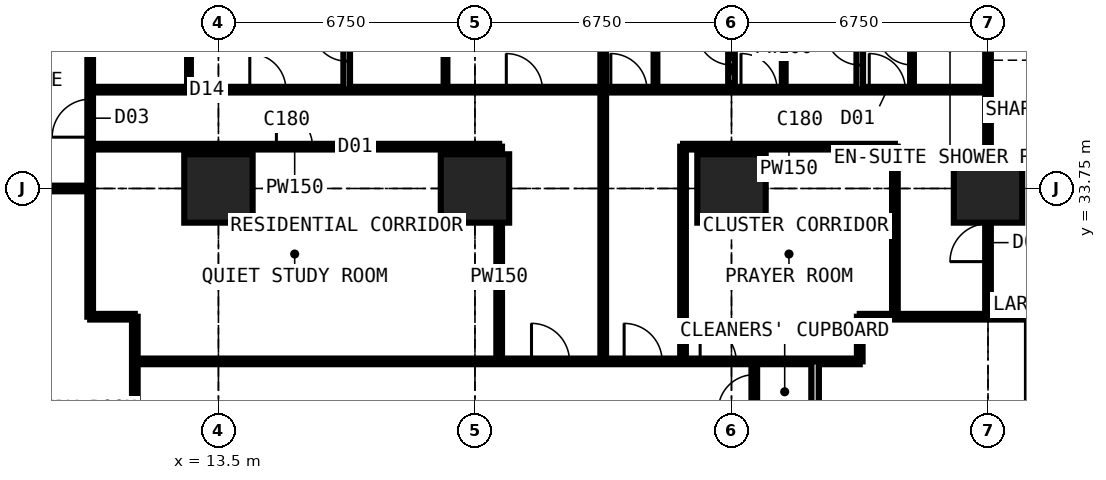
"""IFC4 building model, lengths in metres.
Left out: names, types, materials, properties, quantities, classifications, styles, units other than length and angle.
Written with IfcOpenShell. Run it as: python <this file> out.ifc"""

import sys

from ifc_helpers import new_model, si_unit, direction, frame, frame_2d, origin, origin_2d, place, context, subcontext, project, spatial, rectangle, extrude, element, fill, save


model = new_model("IFC4")
c1 = context("Model", 3, precision=1e-05, world=origin(), true_north=direction((0.0, 1.0)))
c2 = subcontext(c1, "Body", "Model", "MODEL_VIEW")
j1 = project(units=[si_unit("LENGTHUNIT", "METRE"), si_unit("PLANEANGLEUNIT", "RADIAN")], contexts=[c1])
p1 = place(None, origin())
s1 = spatial("IfcSite", under=j1, at=p1, CompositionType="ELEMENT")
p2 = place(p1, origin())
s2 = spatial("IfcBuilding", under=s1, at=p2, CompositionType="ELEMENT")
p3 = place(p2, frame((0.0, 0.0, 54.0)))
s3 = spatial("IfcBuildingStorey", under=s2, at=p3, CompositionType="ELEMENT", Elevation=54.0)
for number, where, z_axis, x_axis in (
    (1, (13.5, 33.75, 0.0), (0.0, 0.0, 1.0), (1.0, 0.0, 0.0)),
    (2, (20.25, 33.75, 0.0), (0.0, 0.0, 1.0), (1.0, 0.0, 0.0)),
    (3, (27.0, 33.75, 0.0), (0.0, 0.0, 1.0), (1.0, 0.0, 0.0)),
    (4, (33.75, 33.75, 0.0), (0.0, 0.0, 1.0), (1.0, 0.0, 0.0)),
):
    element("IfcColumn", number, at=place(p3, frame(where, z_axis=z_axis, x_axis=x_axis)), inside=s3, PredefinedType="COLUMN", context=c2, shape_type="SweptSolid", body=[
        extrude(rectangle(XDim=1.8, YDim=1.8, at=origin_2d()), origin(), (0.0, 0.0, 1.0), 3.6),
    ])
p4 = place(p3, frame((4.15, 33.75, 0.0), z_axis=(0.0, 0.0, 1.0), x_axis=(1.0, 0.0, 0.0)))
e5 = element("IfcWall", 5, at=p4, inside=s3, PredefinedType="PARTITIONING", context=c2, shape_type="SweptSolid", body=[
    extrude(rectangle(XDim=5.975, YDim=0.15, at=frame_2d((2.988, 0.0))), origin(), (0.0, 0.0, 1.0), 2.877),
])
p5 = place(p3, frame((10.125, 30.375, 0.0), z_axis=(0.0, 0.0, 1.0), x_axis=(0.0, 1.0, 0.0)))
e6 = element("IfcWall", 6, at=p5, inside=s3, PredefinedType="PARTITIONING", context=c2, shape_type="SweptSolid", body=[
    extrude(rectangle(XDim=10.859, YDim=0.15, at=frame_2d((5.429, 0.0))), origin(), (0.0, 0.0, 1.0), 3.375),
])
p6 = place(p5, frame((4.725, 0.0, 0.0)))
e7 = element("IfcOpeningElement", 7, at=p6, cuts=e6, PredefinedType="OPENING", context=c2, shape_type="SweptSolid", body=[
    extrude(rectangle(XDim=1.0, YDim=2.2, at=frame_2d((0.5, 1.1))), frame((0.0, 0.085, 0.0), z_axis=(0.0, -1.0, 0.0), x_axis=(1.0, 0.0, 0.0)), (0.0, 0.0, 1.0), 0.17),
])
p7 = place(p3, frame((10.125, 30.375, 0.0), z_axis=(0.0, 0.0, 1.0), x_axis=(1.0, 0.0, 0.0)))
e8 = element("IfcWall", 8, at=p7, inside=s3, PredefinedType="PARTITIONING", context=c2, shape_type="SweptSolid", body=[
    extrude(rectangle(XDim=1.175, YDim=0.15, at=frame_2d((0.587, 0.0))), origin(), (0.0, 0.0, 1.0), 3.375),
])
p8 = place(p3, frame((10.125, 34.85, 0.0), z_axis=(0.0, 0.0, 1.0), x_axis=(1.0, 0.0, 0.0)))
e9 = element("IfcWall", 9, at=p8, inside=s3, PredefinedType="PARTITIONING", context=c2, shape_type="SweptSolid", body=[
    extrude(rectangle(XDim=10.762, YDim=0.15, at=frame_2d((5.381, 0.0))), origin(), (0.0, 0.0, 1.0), 3.375),
])
p9 = place(p8, frame((4.9, 0.0, 0.0)))
e10 = element("IfcOpeningElement", 10, at=p9, cuts=e9, PredefinedType="OPENING", context=c2, shape_type="SweptSolid", body=[
    extrude(rectangle(XDim=0.95, YDim=2.2, at=frame_2d((0.475, 1.1))), frame((0.0, 0.085, 0.0), z_axis=(0.0, -1.0, 0.0), x_axis=(1.0, 0.0, 0.0)), (0.0, 0.0, 1.0), 0.17),
])
p10 = place(p3, frame((10.125, 36.35, 0.0), z_axis=(0.0, 0.0, 1.0), x_axis=(1.0, 0.0, 0.0)))
e11 = element("IfcWall", 11, at=p10, inside=s3, PredefinedType="PARTITIONING", context=c2, shape_type="SweptSolid", body=[
    extrude(rectangle(XDim=23.625, YDim=0.15, at=frame_2d((11.812, 0.0))), origin(), (0.0, 0.0, 1.0), 3.375),
])
p11 = place(p10, frame((20.5, 0.0, 0.0)))
e12 = element("IfcOpeningElement", 12, at=p11, cuts=e11, PredefinedType="OPENING", context=c2, shape_type="SweptSolid", body=[
    extrude(rectangle(XDim=0.95, YDim=2.2, at=frame_2d((0.475, 1.1))), frame((0.0, 0.085, 0.0), z_axis=(0.0, -1.0, 0.0), x_axis=(1.0, 0.0, 0.0)), (0.0, 0.0, 1.0), 0.17),
])
p12 = place(p10, frame((17.125, 0.0, 0.0)))
e13 = element("IfcOpeningElement", 13, at=p12, cuts=e11, PredefinedType="OPENING", context=c2, shape_type="SweptSolid", body=[
    extrude(rectangle(XDim=0.95, YDim=2.2, at=frame_2d((0.475, 1.1))), frame((0.0, 0.085, 0.0), z_axis=(0.0, -1.0, 0.0), x_axis=(1.0, 0.0, 0.0)), (0.0, 0.0, 1.0), 0.17),
])
p13 = place(p10, frame((13.7, 0.0, 0.0)))
e14 = element("IfcOpeningElement", 14, at=p13, cuts=e11, PredefinedType="OPENING", context=c2, shape_type="SweptSolid", body=[
    extrude(rectangle(XDim=0.95, YDim=2.2, at=frame_2d((0.475, 1.1))), frame((0.0, 0.085, 0.0), z_axis=(0.0, -1.0, 0.0), x_axis=(1.0, 0.0, 0.0)), (0.0, 0.0, 1.0), 0.17),
])
p14 = place(p10, frame((4.2, 0.0, 0.0)))
e15 = element("IfcOpeningElement", 15, at=p14, cuts=e11, PredefinedType="OPENING", context=c2, shape_type="SweptSolid", body=[
    extrude(rectangle(XDim=0.95, YDim=2.2, at=frame_2d((0.475, 1.1))), frame((0.0, 0.085, 0.0), z_axis=(0.0, -1.0, 0.0), x_axis=(1.0, 0.0, 0.0)), (0.0, 0.0, 1.0), 0.17),
])
p15 = place(p10, frame((10.95, 0.0, 0.0)))
e16 = element("IfcOpeningElement", 16, at=p15, cuts=e11, PredefinedType="OPENING", context=c2, shape_type="SweptSolid", body=[
    extrude(rectangle(XDim=0.95, YDim=2.2, at=frame_2d((0.475, 1.1))), frame((0.0, 0.085, 0.0), z_axis=(0.0, -1.0, 0.0), x_axis=(1.0, 0.0, 0.0)), (0.0, 0.0, 1.0), 0.17),
])
p16 = place(p3, frame((11.3, 11.3, 0.0), z_axis=(0.0, 0.0, 1.0), x_axis=(0.0, 1.0, 0.0)))
e17 = element("IfcWall", 17, at=p16, inside=s3, PredefinedType="PARTITIONING", context=c2, shape_type="SweptSolid", body=[
    extrude(rectangle(XDim=19.075, YDim=0.15, at=frame_2d((9.538, 0.0))), origin(), (0.0, 0.0, 1.0), 3.375),
])
p17 = place(p16, frame((10.137, 0.0, 0.0)))
e18 = element("IfcOpeningElement", 18, at=p17, cuts=e17, PredefinedType="OPENING", context=c2, shape_type="SweptSolid", body=[
    extrude(rectangle(XDim=1.0, YDim=2.2, at=frame_2d((0.5, 1.1))), frame((0.0, 0.085, 0.0), z_axis=(0.0, -1.0, 0.0), x_axis=(1.0, 0.0, 0.0)), (0.0, 0.0, 1.0), 0.17),
])
p18 = place(p3, frame((11.3, 29.2, 0.0), z_axis=(0.0, 0.0, 1.0), x_axis=(1.0, 0.0, 0.0)))
e19 = element("IfcWall", 19, at=p18, inside=s3, PredefinedType="PARTITIONING", context=c2, shape_type="SweptSolid", body=[
    extrude(rectangle(XDim=19.075, YDim=0.15, at=frame_2d((9.538, 0.0))), origin(), (0.0, 0.0, 1.0), 3.375),
])
p19 = place(p18, frame((12.875, 0.0, 0.0)))
e20 = element("IfcOpeningElement", 20, at=p19, cuts=e19, PredefinedType="OPENING", context=c2, shape_type="SweptSolid", body=[
    extrude(rectangle(XDim=1.0, YDim=2.2, at=frame_2d((0.5, 1.1))), frame((0.0, 0.085, 0.0), z_axis=(0.0, -1.0, 0.0), x_axis=(1.0, 0.0, 0.0)), (0.0, 0.0, 1.0), 0.17),
])
p20 = place(p18, frame((10.438, 0.0, 0.0)))
e21 = element("IfcOpeningElement", 21, at=p20, cuts=e19, PredefinedType="OPENING", context=c2, shape_type="SweptSolid", body=[
    extrude(rectangle(XDim=1.0, YDim=2.2, at=frame_2d((0.5, 1.1))), frame((0.0, 0.085, 0.0), z_axis=(0.0, -1.0, 0.0), x_axis=(1.0, 0.0, 0.0)), (0.0, 0.0, 1.0), 0.17),
])
p21 = place(p18, frame((14.875, 0.0, 0.0)))
e22 = element("IfcOpeningElement", 22, at=p21, cuts=e19, PredefinedType="OPENING", context=c2, shape_type="SweptSolid", body=[
    extrude(rectangle(XDim=0.95, YDim=2.2, at=frame_2d((0.475, 1.1))), frame((0.0, 0.085, 0.0), z_axis=(0.0, -1.0, 0.0), x_axis=(1.0, 0.0, 0.0)), (0.0, 0.0, 1.0), 0.17),
])
p22 = place(p3, frame((12.725, 36.35, 0.0), z_axis=(0.0, 0.0, 1.0), x_axis=(0.0, 1.0, 0.0)))
e23 = element("IfcWall", 23, at=p22, inside=s3, PredefinedType="PARTITIONING", context=c2, shape_type="SweptSolid", body=[
    extrude(rectangle(XDim=2.4, YDim=0.1, at=frame_2d((1.2, 0.0))), origin(), (0.0, 0.0, 1.0), 3.375),
])
p23 = place(p3, frame((16.875, 36.35, 0.0), z_axis=(0.0, 0.0, 1.0), x_axis=(0.0, 1.0, 0.0)))
e24 = element("IfcWall", 24, at=p23, inside=s3, PredefinedType="PARTITIONING", context=c2, shape_type="SweptSolid", body=[
    extrude(rectangle(XDim=4.884, YDim=0.175, at=frame_2d((2.442, 0.0))), origin(), (0.0, 0.0, 1.0), 3.375),
])
p24 = place(p23, frame((0.75, 0.0, 0.0)))
e25 = element("IfcOpeningElement", 25, at=p24, cuts=e24, PredefinedType="OPENING", context=c2, shape_type="SweptSolid", body=[
    extrude(rectangle(XDim=0.9, YDim=2.2, at=frame_2d((0.45, 1.1))), frame((0.0, 0.097, 0.0), z_axis=(0.0, -1.0, 0.0), x_axis=(1.0, 0.0, 0.0)), (0.0, 0.0, 1.0), 0.195),
])
p25 = place(p3, frame((19.475, 36.35, 0.0), z_axis=(0.0, 0.0, 1.0), x_axis=(0.0, 1.0, 0.0)))
e26 = element("IfcWall", 26, at=p25, inside=s3, PredefinedType="PARTITIONING", context=c2, shape_type="SweptSolid", body=[
    extrude(rectangle(XDim=2.4, YDim=0.1, at=frame_2d((1.2, 0.0))), origin(), (0.0, 0.0, 1.0), 3.375),
])
p26 = place(p3, frame((20.887, 29.2, 0.0), z_axis=(0.0, 0.0, 1.0), x_axis=(0.0, 1.0, 0.0)))
e27 = element("IfcWall", 27, at=p26, inside=s3, PredefinedType="PARTITIONING", context=c2, shape_type="SweptSolid", body=[
    extrude(rectangle(XDim=5.65, YDim=0.15, at=frame_2d((2.825, 0.0))), origin(), (0.0, 0.0, 1.0), 3.375),
])
p27 = place(p3, frame((23.625, 29.2, 0.0), z_axis=(0.0, 0.0, 1.0), x_axis=(0.0, 1.0, 0.0)))
e28 = element("IfcWall", 28, at=p27, inside=s3, PredefinedType="PARTITIONING", context=c2, shape_type="SweptSolid", body=[
    extrude(rectangle(XDim=12.034, YDim=0.15, at=frame_2d((6.017, 0.0))), origin(), (0.0, 0.0, 1.0), 3.375),
])
p28 = place(p3, frame((25.0, 36.35, 0.0), z_axis=(0.0, 0.0, 1.0), x_axis=(0.0, 1.0, 0.0)))
e29 = element("IfcWall", 29, at=p28, inside=s3, PredefinedType="PARTITIONING", context=c2, shape_type="SweptSolid", body=[
    extrude(rectangle(XDim=2.2, YDim=0.1, at=frame_2d((1.1, 0.0))), origin(), (0.0, 0.0, 1.0), 3.375),
])
p29 = place(p3, frame((25.725, 29.2, 0.0), z_axis=(0.0, 0.0, 1.0), x_axis=(0.0, 1.0, 0.0)))
e30 = element("IfcWall", 30, at=p29, inside=s3, PredefinedType="PARTITIONING", context=c2, shape_type="SweptSolid", body=[
    extrude(rectangle(XDim=5.65, YDim=0.15, at=frame_2d((2.825, 0.0))), origin(), (0.0, 0.0, 1.0), 3.375),
])
p30 = place(p3, frame((25.725, 34.85, 0.0), z_axis=(0.0, 0.0, 1.0), x_axis=(1.0, 0.0, 0.0)))
e31 = element("IfcWall", 31, at=p30, inside=s3, PredefinedType="PARTITIONING", context=c2, shape_type="SweptSolid", body=[
    extrude(rectangle(XDim=5.575, YDim=0.15, at=frame_2d((2.788, 0.0))), origin(), (0.0, 0.0, 1.0), 3.375),
])
p31 = place(p3, frame((27.0, 36.35, 0.0), z_axis=(0.0, 0.0, 1.0), x_axis=(0.0, 1.0, 0.0)))
e32 = element("IfcWall", 32, at=p31, inside=s3, PredefinedType="PARTITIONING", context=c2, shape_type="SweptSolid", body=[
    extrude(rectangle(XDim=4.884, YDim=0.175, at=frame_2d((2.442, 0.0))), origin(), (0.0, 0.0, 1.0), 2.61),
])
p32 = place(p31, frame((0.65, 0.0, 0.0)))
e33 = element("IfcOpeningElement", 33, at=p32, cuts=e32, PredefinedType="OPENING", context=c2, shape_type="SweptSolid", body=[
    extrude(rectangle(XDim=0.9, YDim=2.2, at=frame_2d((0.45, 1.1))), frame((0.0, 0.097, 0.0), z_axis=(0.0, -1.0, 0.0), x_axis=(1.0, 0.0, 0.0)), (0.0, 0.0, 1.0), 0.195),
])
p33 = place(p3, frame((27.6, 27.6, 0.0), z_axis=(0.0, 0.0, 1.0), x_axis=(0.0, 1.0, 0.0)))
e34 = element("IfcWall", 34, at=p33, inside=s3, PredefinedType="PARTITIONING", context=c2, shape_type="SweptSolid", body=[
    extrude(rectangle(XDim=1.6, YDim=0.15, at=frame_2d((0.8, 0.0))), origin(), (0.0, 0.0, 1.0), 3.375),
])
p34 = place(p33, frame((0.3, 0.0, 0.0)))
e35 = element("IfcOpeningElement", 35, at=p34, cuts=e34, PredefinedType="OPENING", context=c2, shape_type="SweptSolid", body=[
    extrude(rectangle(XDim=0.95, YDim=2.2, at=frame_2d((0.475, 1.1))), frame((0.0, 0.085, 0.0), z_axis=(0.0, -1.0, 0.0), x_axis=(1.0, 0.0, 0.0)), (0.0, 0.0, 1.0), 0.17),
])
p35 = place(p3, frame((28.375, 36.35, 0.0), z_axis=(0.0, 0.0, 1.0), x_axis=(0.0, 1.0, 0.0)))
e36 = element("IfcWall", 36, at=p35, inside=s3, PredefinedType="PARTITIONING", context=c2, shape_type="SweptSolid", body=[
    extrude(rectangle(XDim=2.2, YDim=0.1, at=frame_2d((1.1, 0.0))), origin(), (0.0, 0.0, 1.0), 3.375),
])
p36 = place(p3, frame((29.2, 11.3, 0.0), z_axis=(0.0, 0.0, 1.0), x_axis=(0.0, 1.0, 0.0)))
e37 = element("IfcWall", 37, at=p36, inside=s3, PredefinedType="PARTITIONING", context=c2, shape_type="SweptSolid", body=[
    extrude(rectangle(XDim=17.9, YDim=0.2, at=frame_2d((8.95, 0.0))), origin(), (0.0, 0.0, 1.0), 3.375),
])
p37 = place(p36, frame((8.35, 0.0, 0.0)))
e38 = element("IfcOpeningElement", 38, at=p37, cuts=e37, PredefinedType="OPENING", context=c2, shape_type="SweptSolid", body=[
    extrude(rectangle(XDim=1.2, YDim=2.2, at=frame_2d((0.6, 1.1))), frame((0.0, 0.11, 0.0), z_axis=(0.0, -1.0, 0.0), x_axis=(1.0, 0.0, 0.0)), (0.0, 0.0, 1.0), 0.22),
])
p38 = place(p3, frame((30.375, 29.2, 0.0), z_axis=(0.0, 0.0, 1.0), x_axis=(0.0, 1.0, 0.0)))
e39 = element("IfcWall", 39, at=p38, inside=s3, PredefinedType="PARTITIONING", context=c2, shape_type="SweptSolid", body=[
    extrude(rectangle(XDim=1.175, YDim=0.15, at=frame_2d((0.587, 0.0))), origin(), (0.0, 0.0, 1.0), 3.375),
])
p39 = place(p3, frame((30.375, 30.375, 0.0), z_axis=(0.0, 0.0, 1.0), x_axis=(1.0, 0.0, 0.0)))
e40 = element("IfcWall", 40, at=p39, inside=s3, PredefinedType="PARTITIONING", context=c2, shape_type="SweptSolid", body=[
    extrude(rectangle(XDim=10.859, YDim=0.15, at=frame_2d((5.429, 0.0))), origin(), (0.0, 0.0, 1.0), 3.375),
])
p40 = place(p3, frame((30.375, 36.35, 0.0), z_axis=(0.0, 0.0, 1.0), x_axis=(0.0, 1.0, 0.0)))
e41 = element("IfcWall", 41, at=p40, inside=s3, PredefinedType="PARTITIONING", context=c2, shape_type="SweptSolid", body=[
    extrude(rectangle(XDim=4.884, YDim=0.175, at=frame_2d((2.442, 0.0))), origin(), (0.0, 0.0, 1.0), 3.375),
])
p41 = place(p40, frame((0.65, 0.0, 0.0)))
e42 = element("IfcOpeningElement", 42, at=p41, cuts=e41, PredefinedType="OPENING", context=c2, shape_type="SweptSolid", body=[
    extrude(rectangle(XDim=0.9, YDim=2.2, at=frame_2d((0.45, 1.1))), frame((0.0, 0.097, 0.0), z_axis=(0.0, -1.0, 0.0), x_axis=(1.0, 0.0, 0.0)), (0.0, 0.0, 1.0), 0.195),
])
p42 = place(p3, frame((31.3, 30.375, 0.0), z_axis=(0.0, 0.0, 1.0), x_axis=(0.0, 1.0, 0.0)))
e43 = element("IfcWall", 43, at=p42, inside=s3, PredefinedType="PARTITIONING", context=c2, shape_type="SweptSolid", body=[
    extrude(rectangle(XDim=4.475, YDim=0.15, at=frame_2d((2.238, 0.0))), origin(), (0.0, 0.0, 1.0), 3.375),
])
p43 = place(p3, frame((31.75, 36.35, 0.0), z_axis=(0.0, 0.0, 1.0), x_axis=(0.0, 1.0, 0.0)))
e44 = element("IfcWall", 44, at=p43, inside=s3, PredefinedType="PARTITIONING", context=c2, shape_type="SweptSolid", body=[
    extrude(rectangle(XDim=2.2, YDim=0.1, at=frame_2d((1.1, 0.0))), origin(), (0.0, 0.0, 1.0), 3.375),
])
p44 = place(p43, frame((0.65, 0.0, 0.0)))
e45 = element("IfcOpeningElement", 45, at=p44, cuts=e44, PredefinedType="OPENING", context=c2, shape_type="SweptSolid", body=[
    extrude(rectangle(XDim=0.9, YDim=2.2, at=frame_2d((0.45, 1.1))), frame((0.0, 0.06, 0.0), z_axis=(0.0, -1.0, 0.0), x_axis=(1.0, 0.0, 0.0)), (0.0, 0.0, 1.0), 0.12),
])
p45 = place(p3, frame((33.75, 30.375, 0.0), z_axis=(0.0, 0.0, 1.0), x_axis=(0.0, 1.0, 0.0)))
e46 = element("IfcWall", 46, at=p45, inside=s3, PredefinedType="PARTITIONING", context=c2, shape_type="SweptSolid", body=[
    extrude(rectangle(XDim=10.859, YDim=0.15, at=frame_2d((5.429, 0.0))), origin(), (0.0, 0.0, 1.0), 2.877),
])
p46 = place(p45, frame((1.45, 0.0, 0.0)))
e47 = element("IfcOpeningElement", 47, at=p46, cuts=e46, PredefinedType="OPENING", context=c2, shape_type="SweptSolid", body=[
    extrude(rectangle(XDim=1.0, YDim=2.2, at=frame_2d((0.5, 1.1))), frame((0.0, 0.085, 0.0), z_axis=(0.0, -1.0, 0.0), x_axis=(1.0, 0.0, 0.0)), (0.0, 0.0, 1.0), 0.17),
])
p47 = place(p34, origin())
e48 = element("IfcDoor", 48, at=p47, inside=s3, OperationType="SINGLE_SWING_LEFT", PredefinedType="DOOR", context=c2, shape_type="SweptSolid", body=[
    extrude(rectangle(XDim=0.95, YDim=2.2, at=frame_2d((0.475, 1.1))), frame((0.0, 0.025, 0.0), z_axis=(0.0, -1.0, 0.0), x_axis=(1.0, 0.0, 0.0)), (0.0, 0.0, 1.0), 0.05),
])
fill(e35, e48)
p48 = place(p46, origin())
e49 = element("IfcDoor", 49, at=p48, inside=s3, OperationType="SINGLE_SWING_LEFT", PredefinedType="DOOR", context=c2, shape_type="SweptSolid", body=[
    extrude(rectangle(XDim=1.0, YDim=2.2, at=frame_2d((0.5, 1.1))), frame((0.0, 0.025, 0.0), z_axis=(0.0, -1.0, 0.0), x_axis=(1.0, 0.0, 0.0)), (0.0, 0.0, 1.0), 0.05),
])
fill(e47, e49)
p49 = place(p11, origin())
e50 = element("IfcDoor", 50, at=p49, inside=s3, OperationType="SINGLE_SWING_LEFT", PredefinedType="DOOR", context=c2, shape_type="SweptSolid", body=[
    extrude(rectangle(XDim=0.95, YDim=2.2, at=frame_2d((0.475, 1.1))), frame((0.0, 0.025, 0.0), z_axis=(0.0, -1.0, 0.0), x_axis=(1.0, 0.0, 0.0)), (0.0, 0.0, 1.0), 0.05),
])
fill(e12, e50)
p50 = place(p44, origin())
e51 = element("IfcDoor", 51, at=p50, inside=s3, OperationType="SINGLE_SWING_RIGHT", PredefinedType="DOOR", context=c2, shape_type="SweptSolid", body=[
    extrude(rectangle(XDim=0.9, YDim=2.2, at=frame_2d((0.45, 1.1))), frame((0.0, 0.025, 0.0), z_axis=(0.0, -1.0, 0.0), x_axis=(1.0, 0.0, 0.0)), (0.0, 0.0, 1.0), 0.05),
])
fill(e45, e51)
p51 = place(p12, origin())
e52 = element("IfcDoor", 52, at=p51, inside=s3, OperationType="SINGLE_SWING_LEFT", PredefinedType="DOOR", context=c2, shape_type="SweptSolid", body=[
    extrude(rectangle(XDim=0.95, YDim=2.2, at=frame_2d((0.475, 1.1))), frame((0.0, 0.025, 0.0), z_axis=(0.0, -1.0, 0.0), x_axis=(1.0, 0.0, 0.0)), (0.0, 0.0, 1.0), 0.05),
])
fill(e13, e52)
p52 = place(p41, origin())
e53 = element("IfcDoor", 53, at=p52, inside=s3, OperationType="SINGLE_SWING_RIGHT", PredefinedType="DOOR", context=c2, shape_type="SweptSolid", body=[
    extrude(rectangle(XDim=0.9, YDim=2.2, at=frame_2d((0.45, 1.1))), frame((0.0, 0.025, 0.0), z_axis=(0.0, -1.0, 0.0), x_axis=(1.0, 0.0, 0.0)), (0.0, 0.0, 1.0), 0.05),
])
fill(e42, e53)
p53 = place(p13, origin())
e54 = element("IfcDoor", 54, at=p53, inside=s3, OperationType="SINGLE_SWING_LEFT", PredefinedType="DOOR", context=c2, shape_type="SweptSolid", body=[
    extrude(rectangle(XDim=0.95, YDim=2.2, at=frame_2d((0.475, 1.1))), frame((0.0, 0.025, 0.0), z_axis=(0.0, -1.0, 0.0), x_axis=(1.0, 0.0, 0.0)), (0.0, 0.0, 1.0), 0.05),
])
fill(e14, e54)
p54 = place(p32, origin())
e55 = element("IfcDoor", 55, at=p54, inside=s3, OperationType="SINGLE_SWING_RIGHT", PredefinedType="DOOR", context=c2, shape_type="SweptSolid", body=[
    extrude(rectangle(XDim=0.9, YDim=2.2, at=frame_2d((0.45, 1.1))), frame((0.0, 0.025, 0.0), z_axis=(0.0, -1.0, 0.0), x_axis=(1.0, 0.0, 0.0)), (0.0, 0.0, 1.0), 0.05),
])
fill(e33, e55)
p55 = place(p19, origin())
e56 = element("IfcDoor", 56, at=p55, inside=s3, OperationType="SINGLE_SWING_LEFT", PredefinedType="DOOR", context=c2, shape_type="SweptSolid", body=[
    extrude(rectangle(XDim=1.0, YDim=2.2, at=frame_2d((0.5, 1.1))), frame((0.0, 0.025, 0.0), z_axis=(0.0, -1.0, 0.0), x_axis=(1.0, 0.0, 0.0)), (0.0, 0.0, 1.0), 0.05),
])
fill(e20, e56)
p56 = place(p14, origin())
e57 = element("IfcDoor", 57, at=p56, inside=s3, OperationType="SINGLE_SWING_LEFT", PredefinedType="DOOR", context=c2, shape_type="SweptSolid", body=[
    extrude(rectangle(XDim=0.95, YDim=2.2, at=frame_2d((0.475, 1.1))), frame((0.0, 0.025, 0.0), z_axis=(0.0, -1.0, 0.0), x_axis=(1.0, 0.0, 0.0)), (0.0, 0.0, 1.0), 0.05),
])
fill(e15, e57)
p57 = place(p15, origin())
e58 = element("IfcDoor", 58, at=p57, inside=s3, OperationType="SINGLE_SWING_LEFT", PredefinedType="DOOR", context=c2, shape_type="SweptSolid", body=[
    extrude(rectangle(XDim=0.95, YDim=2.2, at=frame_2d((0.475, 1.1))), frame((0.0, 0.025, 0.0), z_axis=(0.0, -1.0, 0.0), x_axis=(1.0, 0.0, 0.0)), (0.0, 0.0, 1.0), 0.05),
])
fill(e16, e58)
p58 = place(p24, origin())
e59 = element("IfcDoor", 59, at=p58, inside=s3, OperationType="SINGLE_SWING_RIGHT", PredefinedType="DOOR", context=c2, shape_type="SweptSolid", body=[
    extrude(rectangle(XDim=0.9, YDim=2.2, at=frame_2d((0.45, 1.1))), frame((0.0, 0.025, 0.0), z_axis=(0.0, -1.0, 0.0), x_axis=(1.0, 0.0, 0.0)), (0.0, 0.0, 1.0), 0.05),
])
fill(e25, e59)
p59 = place(p20, origin())
e60 = element("IfcDoor", 60, at=p59, inside=s3, OperationType="SINGLE_SWING_LEFT", PredefinedType="DOOR", context=c2, shape_type="SweptSolid", body=[
    extrude(rectangle(XDim=1.0, YDim=2.2, at=frame_2d((0.5, 1.1))), frame((0.0, 0.025, 0.0), z_axis=(0.0, -1.0, 0.0), x_axis=(1.0, 0.0, 0.0)), (0.0, 0.0, 1.0), 0.05),
])
fill(e21, e60)
p60 = place(p21, origin())
e61 = element("IfcDoor", 61, at=p60, inside=s3, OperationType="SINGLE_SWING_LEFT", PredefinedType="DOOR", context=c2, shape_type="SweptSolid", body=[
    extrude(rectangle(XDim=0.95, YDim=2.2, at=frame_2d((0.475, 1.1))), frame((0.0, 0.025, 0.0), z_axis=(0.0, -1.0, 0.0), x_axis=(1.0, 0.0, 0.0)), (0.0, 0.0, 1.0), 0.05),
])
fill(e22, e61)
p61 = place(p9, origin())
e62 = element("IfcDoor", 62, at=p61, inside=s3, OperationType="SINGLE_SWING_LEFT", PredefinedType="DOOR", context=c2, shape_type="SweptSolid", body=[
    extrude(rectangle(XDim=0.95, YDim=2.2, at=frame_2d((0.475, 1.1))), frame((0.0, 0.025, 0.0), z_axis=(0.0, -1.0, 0.0), x_axis=(1.0, 0.0, 0.0)), (0.0, 0.0, 1.0), 0.05),
])
fill(e10, e62)
p62 = place(p6, origin())
e63 = element("IfcDoor", 63, at=p62, inside=s3, OperationType="SINGLE_SWING_LEFT", PredefinedType="DOOR", context=c2, shape_type="SweptSolid", body=[
    extrude(rectangle(XDim=1.0, YDim=2.2, at=frame_2d((0.5, 1.1))), frame((0.0, 0.025, 0.0), z_axis=(0.0, -1.0, 0.0), x_axis=(1.0, 0.0, 0.0)), (0.0, 0.0, 1.0), 0.05),
])
fill(e7, e63)
save(model, sys.argv[1])
